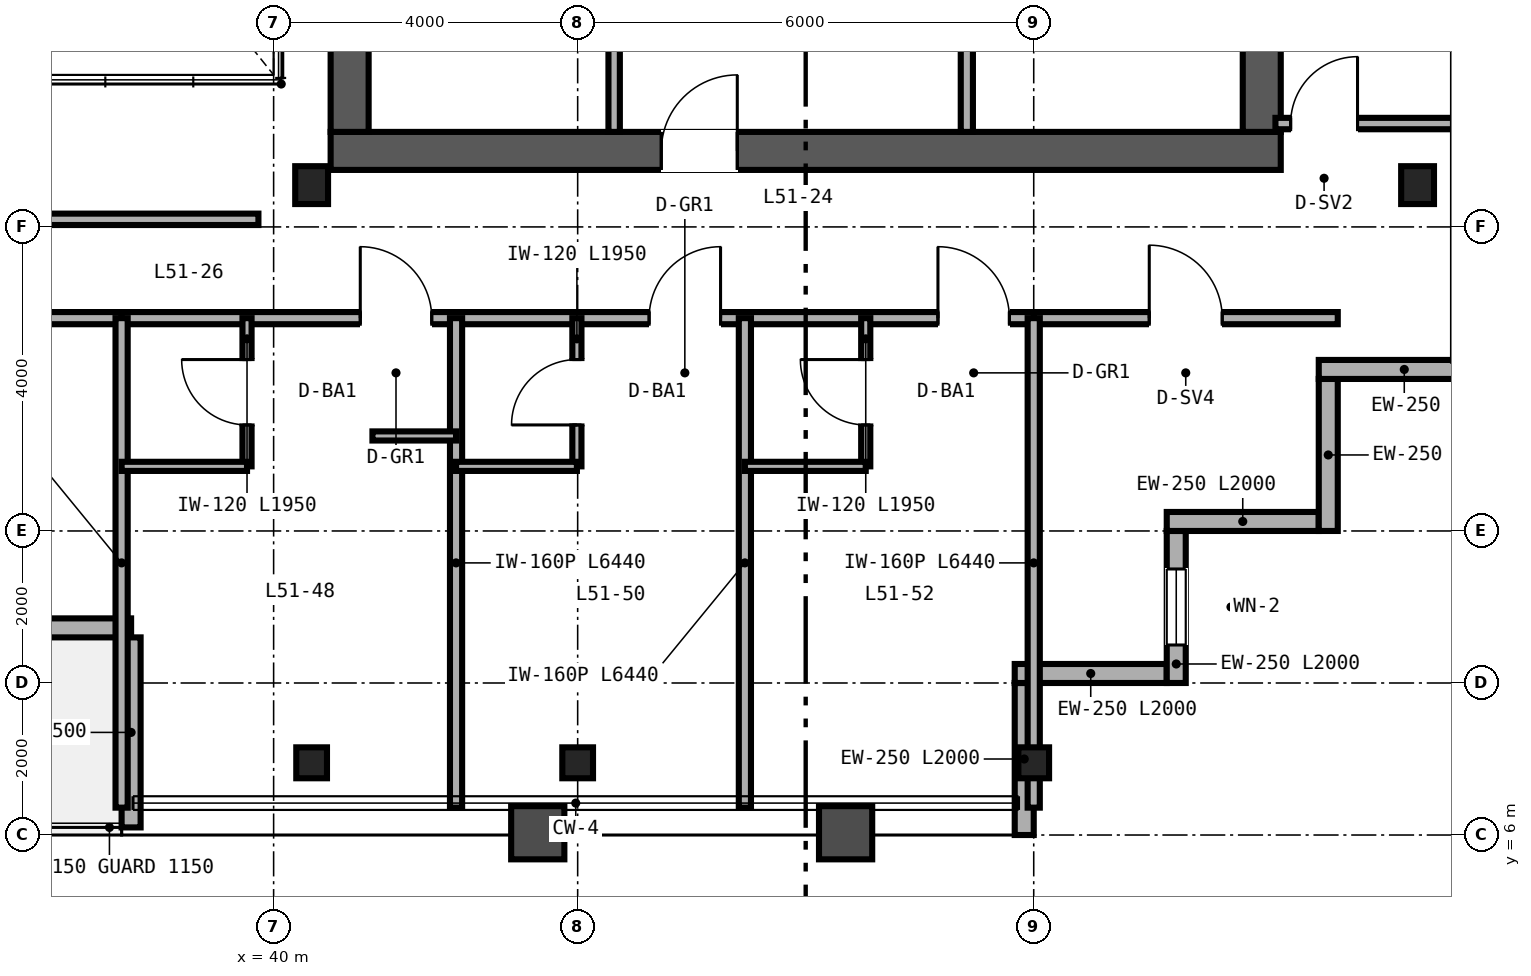
"""IFC4 building model, lengths in metres.
Left out: names, types, materials, properties, quantities, classifications, styles, units other than length and angle.
Written with IfcOpenShell. Run it as: python <this file> out.ifc"""

import sys

from ifc_helpers import new_model, si_unit, direction, frame, frame_2d, origin, origin_2d, place, context, subcontext, project, spatial, rectangle, i_section, extrude, source, transform, mapped, element, fill, save


model = new_model("IFC4")
c1 = context("Model", 3, precision=1e-05, world=origin(), true_north=direction((0.0, 1.0)))
c2 = subcontext(c1, "Body", "Model", "MODEL_VIEW")
j1 = project(units=[si_unit("LENGTHUNIT", "METRE"), si_unit("PLANEANGLEUNIT", "RADIAN")], contexts=[c1])
p1 = place(None, origin())
s1 = spatial("IfcSite", under=j1, at=p1, CompositionType="ELEMENT")
p2 = place(p1, origin())
s2 = spatial("IfcBuilding", under=s1, at=p2, CompositionType="ELEMENT")
p3 = place(p2, frame((0.0, 0.0, 202.8)))
s3 = spatial("IfcBuildingStorey", under=s2, at=p3, CompositionType="ELEMENT", Elevation=202.8)
p4 = place(p3, frame((40.75, 15.0, 0.0), z_axis=(0.0, 0.0, 1.0), x_axis=(1.0, 0.0, 0.0)))
e1 = element("IfcWall", 1, at=p4, inside=s3, PredefinedType="SHEAR", context=c2, shape_type="SweptSolid", body=[
    extrude(rectangle(XDim=12.5, YDim=0.5, at=frame_2d((6.25, 0.0))), origin(), (0.0, 0.0, 1.0), 3.37),
])
p5 = place(p4, frame((4.35, 0.0, 0.0)))
e2 = element("IfcOpeningElement", 2, at=p5, cuts=e1, PredefinedType="OPENING", context=c2, shape_type="SweptSolid", body=[
    extrude(rectangle(XDim=1.0, YDim=2.15, at=frame_2d((0.5, 1.075))), frame((0.0, 0.26, 0.0), z_axis=(0.0, -1.0, 0.0), x_axis=(1.0, 0.0, 0.0)), (0.0, 0.0, 1.0), 0.52),
])
for number, where, z_axis, x_axis in (
    (3, (41.0, 15.25, 0.0), (0.0, 0.0, 1.0), (0.0, 1.0, 0.0)),
    (4, (53.0, 15.25, 0.0), (0.0, 0.0, 1.0), (0.0, 1.0, 0.0)),
):
    element("IfcWall", number, at=place(p3, frame(where, z_axis=z_axis, x_axis=x_axis)), inside=s3, PredefinedType="SHEAR", context=c2, shape_type="SweptSolid", body=[
        extrude(rectangle(XDim=21.5, YDim=0.5, at=frame_2d((10.75, 0.0))), origin(), (0.0, 0.0, 1.0), 3.37),
    ])
m1 = source(origin(), c2, "Body", "SweptSolid", [
    extrude(i_section(OverallWidth=0.432, OverallDepth=0.498, WebThickness=0.056, FlangeThickness=0.089, FilletRadius=0.025, at=origin_2d()), origin(), (0.0, 0.0, 1.0), 3.37),
])
for number, where, z_axis, x_axis in (
    (5, (40.5, 14.55, 0.0), (0.0, 0.0, 1.0), (1.0, 0.0, 0.0)),
    (6, (55.05, 14.55, 0.0), (0.0, 0.0, 1.0), (1.0, 0.0, 0.0)),
):
    element("IfcColumn", number, at=place(p3, frame(where, z_axis=z_axis, x_axis=x_axis)), inside=s3, PredefinedType="COLUMN", context=c2, shape_type="MappedRepresentation", body=[
        mapped(m1, transform((0.0, 0.0, 0.0), scale=1.0)),
    ])
m2 = source(origin(), c2, "Body", "SweptSolid", [
    extrude(i_section(OverallWidth=0.404, OverallDepth=0.407, WebThickness=0.027, FlangeThickness=0.044, FilletRadius=0.025, at=origin_2d()), origin(), (0.0, 0.0, 1.0), 3.37),
])
for number, where, z_axis, x_axis in (
    (7, (40.5, 6.95, 0.0), (0.0, 0.0, 1.0), (1.0, 0.0, 0.0)),
    (8, (44.0, 6.95, 0.0), (0.0, 0.0, 1.0), (1.0, 0.0, 0.0)),
    (9, (50.0, 6.95, 0.0), (0.0, 0.0, 1.0), (1.0, 0.0, 0.0)),
):
    element("IfcColumn", number, at=place(p3, frame(where, z_axis=z_axis, x_axis=x_axis)), inside=s3, PredefinedType="COLUMN", context=c2, shape_type="MappedRepresentation", body=[
        mapped(m2, transform((0.0, 0.0, 0.0), scale=1.0)),
    ])
p6 = place(p3, frame((49.875, 6.0, 0.0), z_axis=(0.0, 0.0, 1.0), x_axis=(0.0, 1.0, 0.0)))
e10 = element("IfcWall", 10, at=p6, inside=s3, PredefinedType="SOLIDWALL", context=c2, shape_type="SweptSolid", body=[
    extrude(rectangle(XDim=2.0, YDim=0.25, at=frame_2d((1.0, 0.0))), origin(), (0.0, 0.0, 1.0), 2.677),
])
p7 = place(p3, frame((49.75, 8.125, 0.0), z_axis=(0.0, 0.0, 1.0), x_axis=(1.0, 0.0, 0.0)))
e11 = element("IfcWall", 11, at=p7, inside=s3, PredefinedType="SOLIDWALL", context=c2, shape_type="SweptSolid", body=[
    extrude(rectangle(XDim=2.0, YDim=0.25, at=frame_2d((1.0, 0.0))), origin(), (0.0, 0.0, 1.0), 3.37),
])
p8 = place(p3, frame((51.875, 8.0, 0.0), z_axis=(0.0, 0.0, 1.0), x_axis=(0.0, 1.0, 0.0)))
e12 = element("IfcWall", 12, at=p8, inside=s3, PredefinedType="SOLIDWALL", context=c2, shape_type="SweptSolid", body=[
    extrude(rectangle(XDim=2.0, YDim=0.25, at=frame_2d((1.0, 0.0))), origin(), (0.0, 0.0, 1.0), 3.37),
])
p9 = place(p8, frame((0.5, 0.0, 0.85)))
e13 = element("IfcOpeningElement", 13, at=p9, cuts=e12, PredefinedType="OPENING", context=c2, shape_type="SweptSolid", body=[
    extrude(rectangle(XDim=1.0, YDim=1.9, at=frame_2d((0.5, 0.95))), frame((0.0, 0.135, 0.0), z_axis=(0.0, -1.0, 0.0), x_axis=(1.0, 0.0, 0.0)), (0.0, 0.0, 1.0), 0.27),
])
for number, where, z_axis, x_axis in (
    (14, (51.75, 10.125, 0.0), (0.0, 0.0, 1.0), (1.0, 0.0, 0.0)),
    (15, (53.875, 10.0, 0.0), (0.0, 0.0, 1.0), (0.0, 1.0, 0.0)),
):
    element("IfcWall", number, at=place(p3, frame(where, z_axis=z_axis, x_axis=x_axis)), inside=s3, PredefinedType="SOLIDWALL", context=c2, shape_type="SweptSolid", body=[
        extrude(rectangle(XDim=2.0, YDim=0.25, at=frame_2d((1.0, 0.0))), origin(), (0.0, 0.0, 1.0), 3.37),
    ])
p10 = place(p3, frame((53.75, 12.125, 0.0), z_axis=(0.0, 0.0, 1.0), x_axis=(1.0, 0.0, 0.0)))
e16 = element("IfcWall", 16, at=p10, inside=s3, PredefinedType="SOLIDWALL", context=c2, shape_type="SweptSolid", body=[
    extrude(rectangle(XDim=2.25, YDim=0.25, at=frame_2d((1.125, 0.0))), origin(), (0.0, 0.0, 1.0), 3.37),
])
p11 = place(p3, frame((25.875, 8.725, 0.0), z_axis=(0.0, 0.0, 1.0), x_axis=(1.0, 0.0, 0.0)))
e17 = element("IfcWall", 17, at=p11, inside=s3, PredefinedType="SOLIDWALL", context=c2, shape_type="SweptSolid", body=[
    extrude(rectangle(XDim=12.25, YDim=0.25, at=frame_2d((6.125, 0.0))), origin(), (0.0, 0.0, 1.0), 3.37),
])
p12 = place(p11, frame((5.6, 0.0, 0.0)))
e18 = element("IfcOpeningElement", 18, at=p12, cuts=e17, PredefinedType="OPENING", context=c2, shape_type="SweptSolid", body=[
    extrude(rectangle(XDim=1.05, YDim=2.15, at=frame_2d((0.525, 1.075))), frame((0.0, 0.135, 0.0), z_axis=(0.0, -1.0, 0.0), x_axis=(1.0, 0.0, 0.0)), (0.0, 0.0, 1.0), 0.27),
])
p13 = place(p3, frame((38.125, 6.1, 0.0), z_axis=(0.0, 0.0, 1.0), x_axis=(0.0, 1.0, 0.0)))
e19 = element("IfcWall", 19, at=p13, inside=s3, PredefinedType="SOLIDWALL", context=c2, shape_type="SweptSolid", body=[
    extrude(rectangle(XDim=2.5, YDim=0.25, at=frame_2d((1.25, 0.0))), origin(), (0.0, 0.0, 1.0), 2.443),
])
p14 = place(p3, frame((49.12, 15.25, 0.0), z_axis=(0.0, 0.0, 1.0), x_axis=(0.0, 1.0, 0.0)))
e20 = element("IfcWall", 20, at=p14, inside=s3, PredefinedType="PARTITIONING", context=c2, shape_type="SweptSolid", body=[
    extrude(rectangle(XDim=16.13, YDim=0.16, at=frame_2d((8.065, 0.0))), origin(), (0.0, 0.0, 1.0), 2.443),
])
p15 = place(p14, frame((4.0, 0.0, 0.0)))
e21 = element("IfcOpeningElement", 21, at=p15, cuts=e20, PredefinedType="OPENING", context=c2, shape_type="SweptSolid", body=[
    extrude(rectangle(XDim=0.92, YDim=2.15, at=frame_2d((0.46, 1.075))), frame((0.0, 0.09, 0.0), z_axis=(0.0, -1.0, 0.0), x_axis=(1.0, 0.0, 0.0)), (0.0, 0.0, 1.0), 0.18),
])
p16 = place(p14, frame((12.0, 0.0, 0.0)))
e22 = element("IfcOpeningElement", 22, at=p16, cuts=e20, PredefinedType="OPENING", context=c2, shape_type="SweptSolid", body=[
    extrude(rectangle(XDim=0.92, YDim=2.15, at=frame_2d((0.46, 1.075))), frame((0.0, 0.09, 0.0), z_axis=(0.0, -1.0, 0.0), x_axis=(1.0, 0.0, 0.0)), (0.0, 0.0, 1.0), 0.18),
])
p17 = place(p3, frame((44.48, 15.25, 0.0), z_axis=(0.0, 0.0, 1.0), x_axis=(0.0, 1.0, 0.0)))
e23 = element("IfcWall", 23, at=p17, inside=s3, PredefinedType="PARTITIONING", context=c2, shape_type="SweptSolid", body=[
    extrude(rectangle(XDim=11.63, YDim=0.15, at=frame_2d((5.815, 0.0))), origin(), (0.0, 0.0, 1.0), 3.37),
])
p18 = place(p17, frame((4.5, 0.0, 0.0)))
e24 = element("IfcOpeningElement", 24, at=p18, cuts=e23, PredefinedType="OPENING", context=c2, shape_type="SweptSolid", body=[
    extrude(rectangle(XDim=0.92, YDim=2.15, at=frame_2d((0.46, 1.075))), frame((0.0, 0.085, 0.0), z_axis=(0.0, -1.0, 0.0), x_axis=(1.0, 0.0, 0.0)), (0.0, 0.0, 1.0), 0.17),
])
p19 = place(p3, frame((24.2, 14.1, 0.0), z_axis=(0.0, 0.0, 1.0), x_axis=(1.0, 0.0, 0.0)))
e25 = element("IfcWall", 25, at=p19, inside=s3, PredefinedType="PARTITIONING", context=c2, shape_type="SweptSolid", body=[
    extrude(rectangle(XDim=15.6, YDim=0.15, at=frame_2d((7.8, 0.0))), origin(), (0.0, 0.0, 1.0), 3.37),
])
p20 = place(p19, frame((3.0, 0.0, 0.0)))
e26 = element("IfcOpeningElement", 26, at=p20, cuts=e25, PredefinedType="OPENING", context=c2, shape_type="SweptSolid", body=[
    extrude(rectangle(XDim=0.9, YDim=2.15, at=frame_2d((0.45, 1.075))), frame((0.0, 0.085, 0.0), z_axis=(0.0, -1.0, 0.0), x_axis=(1.0, 0.0, 0.0)), (0.0, 0.0, 1.0), 0.17),
])
p21 = place(p19, frame((11.0, 0.0, 0.0)))
e27 = element("IfcOpeningElement", 27, at=p21, cuts=e25, PredefinedType="OPENING", context=c2, shape_type="SweptSolid", body=[
    extrude(rectangle(XDim=0.9, YDim=2.15, at=frame_2d((0.45, 1.075))), frame((0.0, 0.085, 0.0), z_axis=(0.0, -1.0, 0.0), x_axis=(1.0, 0.0, 0.0)), (0.0, 0.0, 1.0), 0.17),
])
p22 = place(p3, frame((53.18, 15.36, 0.0), z_axis=(0.0, 0.0, 1.0), x_axis=(1.0, 0.0, 0.0)))
e28 = element("IfcWall", 28, at=p22, inside=s3, PredefinedType="PARTITIONING", context=c2, shape_type="SweptSolid", body=[
    extrude(rectangle(XDim=2.66, YDim=0.15, at=frame_2d((1.33, 0.0))), origin(), (0.0, 0.0, 1.0), 2.591),
])
p23 = place(p22, frame((0.2, 0.0, 0.0)))
e29 = element("IfcOpeningElement", 29, at=p23, cuts=e28, PredefinedType="OPENING", context=c2, shape_type="SweptSolid", body=[
    extrude(rectangle(XDim=0.88, YDim=2.15, at=frame_2d((0.44, 1.075))), frame((0.0, 0.085, 0.0), z_axis=(0.0, -1.0, 0.0), x_axis=(1.0, 0.0, 0.0)), (0.0, 0.0, 1.0), 0.17),
])
p24 = place(p3, frame((50.0, 12.8, 0.0), z_axis=(0.0, 0.0, 1.0), x_axis=(1.0, 0.0, 0.0)))
e30 = element("IfcWall", 30, at=p24, inside=s3, PredefinedType="PARTITIONING", context=c2, shape_type="SweptSolid", body=[
    extrude(rectangle(XDim=4.0, YDim=0.16, at=frame_2d((2.0, 0.0))), origin(), (0.0, 0.0, 1.0), 3.37),
])
p25 = place(p24, frame((1.52, 0.0, 0.0)))
e31 = element("IfcOpeningElement", 31, at=p25, cuts=e30, PredefinedType="OPENING", context=c2, shape_type="SweptSolid", body=[
    extrude(rectangle(XDim=0.96, YDim=2.15, at=frame_2d((0.48, 1.075))), frame((0.0, 0.09, 0.0), z_axis=(0.0, -1.0, 0.0), x_axis=(1.0, 0.0, 0.0)), (0.0, 0.0, 1.0), 0.18),
])
p26 = place(p3, frame((26.0, 12.8, 0.0), z_axis=(0.0, 0.0, 1.0), x_axis=(1.0, 0.0, 0.0)))
e32 = element("IfcWall", 32, at=p26, inside=s3, PredefinedType="PARTITIONING", context=c2, shape_type="SweptSolid", body=[
    extrude(rectangle(XDim=12.0, YDim=0.16, at=frame_2d((6.0, 0.0))), origin(), (0.0, 0.0, 1.0), 3.37),
])
p27 = place(p26, frame((5.2, 0.0, 0.0)))
e33 = element("IfcOpeningElement", 33, at=p27, cuts=e32, PredefinedType="OPENING", context=c2, shape_type="SweptSolid", body=[
    extrude(rectangle(XDim=0.96, YDim=2.15, at=frame_2d((0.48, 1.075))), frame((0.0, 0.09, 0.0), z_axis=(0.0, -1.0, 0.0), x_axis=(1.0, 0.0, 0.0)), (0.0, 0.0, 1.0), 0.18),
])
p28 = place(p3, frame((38.0, 12.8, 0.0), z_axis=(0.0, 0.0, 1.0), x_axis=(1.0, 0.0, 0.0)))
e34 = element("IfcWall", 34, at=p28, inside=s3, PredefinedType="PARTITIONING", context=c2, shape_type="SweptSolid", body=[
    extrude(rectangle(XDim=12.0, YDim=0.16, at=frame_2d((6.0, 0.0))), origin(), (0.0, 0.0, 1.0), 2.913),
])
p29 = place(p28, frame((3.14, 0.0, 0.0)))
e35 = element("IfcOpeningElement", 35, at=p29, cuts=e34, PredefinedType="OPENING", context=c2, shape_type="SweptSolid", body=[
    extrude(rectangle(XDim=0.94, YDim=2.15, at=frame_2d((0.47, 1.075))), frame((0.0, 0.09, 0.0), z_axis=(0.0, -1.0, 0.0), x_axis=(1.0, 0.0, 0.0)), (0.0, 0.0, 1.0), 0.18),
])
p30 = place(p28, frame((6.94, 0.0, 0.0)))
e36 = element("IfcOpeningElement", 36, at=p30, cuts=e34, PredefinedType="OPENING", context=c2, shape_type="SweptSolid", body=[
    extrude(rectangle(XDim=0.94, YDim=2.15, at=frame_2d((0.47, 1.075))), frame((0.0, 0.09, 0.0), z_axis=(0.0, -1.0, 0.0), x_axis=(1.0, 0.0, 0.0)), (0.0, 0.0, 1.0), 0.18),
])
p31 = place(p28, frame((10.74, 0.0, 0.0)))
e37 = element("IfcOpeningElement", 37, at=p31, cuts=e34, PredefinedType="OPENING", context=c2, shape_type="SweptSolid", body=[
    extrude(rectangle(XDim=0.94, YDim=2.15, at=frame_2d((0.47, 1.075))), frame((0.0, 0.09, 0.0), z_axis=(0.0, -1.0, 0.0), x_axis=(1.0, 0.0, 0.0)), (0.0, 0.0, 1.0), 0.18),
])
p32 = place(p3, frame((38.0, 6.36, 0.0), z_axis=(0.0, 0.0, 1.0), x_axis=(0.0, 1.0, 0.0)))
e38 = element("IfcWall", 38, at=p32, inside=s3, PredefinedType="PARTITIONING", context=c2, shape_type="SweptSolid", body=[
    extrude(rectangle(XDim=6.44, YDim=0.16, at=frame_2d((3.22, 0.0))), origin(), (0.0, 0.0, 1.0), 2.443),
])
p33 = place(p3, frame((50.0, 6.36, 0.0), z_axis=(0.0, 0.0, 1.0), x_axis=(0.0, 1.0, 0.0)))
e39 = element("IfcWall", 39, at=p33, inside=s3, PredefinedType="PARTITIONING", context=c2, shape_type="SweptSolid", body=[
    extrude(rectangle(XDim=6.44, YDim=0.16, at=frame_2d((3.22, 0.0))), origin(), (0.0, 0.0, 1.0), 2.677),
])
p34 = place(p3, frame((42.4, 6.36, 0.0), z_axis=(0.0, 0.0, 1.0), x_axis=(0.0, 1.0, 0.0)))
e40 = element("IfcWall", 40, at=p34, inside=s3, PredefinedType="PARTITIONING", context=c2, shape_type="SweptSolid", body=[
    extrude(rectangle(XDim=6.44, YDim=0.16, at=frame_2d((3.22, 0.0))), origin(), (0.0, 0.0, 1.0), 2.833),
])
p35 = place(p3, frame((39.65, 10.85, 0.0), z_axis=(0.0, 0.0, 1.0), x_axis=(0.0, 1.0, 0.0)))
e41 = element("IfcWall", 41, at=p35, inside=s3, PredefinedType="PARTITIONING", context=c2, shape_type="SweptSolid", body=[
    extrude(rectangle(XDim=1.95, YDim=0.12, at=frame_2d((0.975, 0.0))), origin(), (0.0, 0.0, 1.0), 3.37),
])
p36 = place(p35, frame((0.545, 0.0, 0.0)))
e42 = element("IfcOpeningElement", 42, at=p36, cuts=e41, PredefinedType="OPENING", context=c2, shape_type="SweptSolid", body=[
    extrude(rectangle(XDim=0.86, YDim=2.1, at=frame_2d((0.43, 1.05))), frame((0.0, 0.07, 0.0), z_axis=(0.0, -1.0, 0.0), x_axis=(1.0, 0.0, 0.0)), (0.0, 0.0, 1.0), 0.14),
])
p37 = place(p3, frame((38.0, 10.85, 0.0), z_axis=(0.0, 0.0, 1.0), x_axis=(1.0, 0.0, 0.0)))
e43 = element("IfcWall", 43, at=p37, inside=s3, PredefinedType="PARTITIONING", context=c2, shape_type="SweptSolid", body=[
    extrude(rectangle(XDim=1.65, YDim=0.12, at=frame_2d((0.825, 0.0))), origin(), (0.0, 0.0, 1.0), 3.37),
])
p38 = place(p3, frame((41.3, 11.25, 0.0), z_axis=(0.0, 0.0, 1.0), x_axis=(1.0, 0.0, 0.0)))
e44 = element("IfcWall", 44, at=p38, inside=s3, PredefinedType="PARTITIONING", context=c2, shape_type="SweptSolid", body=[
    extrude(rectangle(XDim=1.1, YDim=0.12, at=frame_2d((0.55, 0.0))), origin(), (0.0, 0.0, 1.0), 3.37),
])
p39 = place(p3, frame((46.2, 6.36, 0.0), z_axis=(0.0, 0.0, 1.0), x_axis=(0.0, 1.0, 0.0)))
e45 = element("IfcWall", 45, at=p39, inside=s3, PredefinedType="PARTITIONING", context=c2, shape_type="SweptSolid", body=[
    extrude(rectangle(XDim=6.44, YDim=0.16, at=frame_2d((3.22, 0.0))), origin(), (0.0, 0.0, 1.0), 2.677),
])
p40 = place(p3, frame((43.99, 10.85, 0.0), z_axis=(0.0, 0.0, 1.0), x_axis=(0.0, 1.0, 0.0)))
e46 = element("IfcWall", 46, at=p40, inside=s3, PredefinedType="PARTITIONING", context=c2, shape_type="SweptSolid", body=[
    extrude(rectangle(XDim=1.95, YDim=0.12, at=frame_2d((0.975, 0.0))), origin(), (0.0, 0.0, 1.0), 3.37),
])
p41 = place(p40, frame((0.545, 0.0, 0.0)))
e47 = element("IfcOpeningElement", 47, at=p41, cuts=e46, PredefinedType="OPENING", context=c2, shape_type="SweptSolid", body=[
    extrude(rectangle(XDim=0.86, YDim=2.1, at=frame_2d((0.43, 1.05))), frame((0.0, 0.07, 0.0), z_axis=(0.0, -1.0, 0.0), x_axis=(1.0, 0.0, 0.0)), (0.0, 0.0, 1.0), 0.14),
])
p42 = place(p3, frame((42.4, 10.85, 0.0), z_axis=(0.0, 0.0, 1.0), x_axis=(1.0, 0.0, 0.0)))
e48 = element("IfcWall", 48, at=p42, inside=s3, PredefinedType="PARTITIONING", context=c2, shape_type="SweptSolid", body=[
    extrude(rectangle(XDim=1.59, YDim=0.12, at=frame_2d((0.795, 0.0))), origin(), (0.0, 0.0, 1.0), 3.37),
])
p43 = place(p3, frame((47.79, 10.85, 0.0), z_axis=(0.0, 0.0, 1.0), x_axis=(0.0, 1.0, 0.0)))
e49 = element("IfcWall", 49, at=p43, inside=s3, PredefinedType="PARTITIONING", context=c2, shape_type="SweptSolid", body=[
    extrude(rectangle(XDim=1.95, YDim=0.12, at=frame_2d((0.975, 0.0))), origin(), (0.0, 0.0, 1.0), 3.37),
])
p44 = place(p43, frame((0.545, 0.0, 0.0)))
e50 = element("IfcOpeningElement", 50, at=p44, cuts=e49, PredefinedType="OPENING", context=c2, shape_type="SweptSolid", body=[
    extrude(rectangle(XDim=0.86, YDim=2.1, at=frame_2d((0.43, 1.05))), frame((0.0, 0.07, 0.0), z_axis=(0.0, -1.0, 0.0), x_axis=(1.0, 0.0, 0.0)), (0.0, 0.0, 1.0), 0.14),
])
p45 = place(p3, frame((46.2, 10.85, 0.0), z_axis=(0.0, 0.0, 1.0), x_axis=(1.0, 0.0, 0.0)))
e51 = element("IfcWall", 51, at=p45, inside=s3, PredefinedType="PARTITIONING", context=c2, shape_type="SweptSolid", body=[
    extrude(rectangle(XDim=1.59, YDim=0.12, at=frame_2d((0.795, 0.0))), origin(), (0.0, 0.0, 1.0), 3.37),
])
m3 = source(origin(), c2, "Body", "SweptSolid", [
    extrude(rectangle(XDim=1.0, YDim=1.9, at=frame_2d((0.5, 0.95))), frame((0.0, 0.03, 0.0), z_axis=(0.0, -1.0, 0.0), x_axis=(1.0, 0.0, 0.0)), (0.0, 0.0, 1.0), 0.06),
])
p46 = place(p9, origin())
e52 = element("IfcWindow", 52, at=p46, inside=s3, PartitioningType="SINGLE_PANEL", PredefinedType="WINDOW", context=c2, shape_type="MappedRepresentation", body=[
    mapped(m3, transform((0.0, 0.0, 0.0), scale=1.0)),
])
fill(e13, e52)
m4 = source(origin(), c2, "Body", "SweptSolid", [
    extrude(rectangle(XDim=1.0, YDim=2.15, at=frame_2d((0.5, 1.075))), frame((0.0, 0.025, 0.0), z_axis=(0.0, -1.0, 0.0), x_axis=(1.0, 0.0, 0.0)), (0.0, 0.0, 1.0), 0.05),
])
p47 = place(p5, origin())
e53 = element("IfcDoor", 53, at=p47, inside=s3, OperationType="SINGLE_SWING_RIGHT", PredefinedType="DOOR", context=c2, shape_type="MappedRepresentation", body=[
    mapped(m4, transform((0.0, 0.0, 0.0), scale=1.0)),
])
fill(e2, e53)
m5 = source(origin(), c2, "Body", "SweptSolid", [
    extrude(rectangle(XDim=0.88, YDim=2.15, at=frame_2d((0.44, 1.075))), frame((0.0, 0.025, 0.0), z_axis=(0.0, -1.0, 0.0), x_axis=(1.0, 0.0, 0.0)), (0.0, 0.0, 1.0), 0.05),
])
p48 = place(p23, origin())
e54 = element("IfcDoor", 54, at=p48, inside=s3, OperationType="SINGLE_SWING_RIGHT", PredefinedType="DOOR", context=c2, shape_type="MappedRepresentation", body=[
    mapped(m5, transform((0.0, 0.0, 0.0), scale=1.0)),
])
fill(e29, e54)
m6 = source(origin(), c2, "Body", "SweptSolid", [
    extrude(rectangle(XDim=0.96, YDim=2.15, at=frame_2d((0.48, 1.075))), frame((0.0, 0.025, 0.0), z_axis=(0.0, -1.0, 0.0), x_axis=(1.0, 0.0, 0.0)), (0.0, 0.0, 1.0), 0.05),
])
p49 = place(p25, origin())
e55 = element("IfcDoor", 55, at=p49, inside=s3, OperationType="SINGLE_SWING_LEFT", PredefinedType="DOOR", context=c2, shape_type="MappedRepresentation", body=[
    mapped(m6, transform((0.0, 0.0, 0.0), scale=1.0)),
])
fill(e31, e55)
m7 = source(origin(), c2, "Body", "SweptSolid", [
    extrude(rectangle(XDim=0.86, YDim=2.1, at=frame_2d((0.43, 1.05))), frame((0.0, 0.025, 0.0), z_axis=(0.0, -1.0, 0.0), x_axis=(1.0, 0.0, 0.0)), (0.0, 0.0, 1.0), 0.05),
])
p50 = place(p36, origin())
e56 = element("IfcDoor", 56, at=p50, inside=s3, OperationType="SINGLE_SWING_RIGHT", PredefinedType="DOOR", context=c2, shape_type="MappedRepresentation", body=[
    mapped(m7, transform((0.0, 0.0, 0.0), scale=1.0)),
])
fill(e42, e56)
p51 = place(p41, origin())
e57 = element("IfcDoor", 57, at=p51, inside=s3, OperationType="SINGLE_SWING_LEFT", PredefinedType="DOOR", context=c2, shape_type="MappedRepresentation", body=[
    mapped(m7, transform((0.0, 0.0, 0.0), scale=1.0)),
])
fill(e47, e57)
p52 = place(p44, origin())
e58 = element("IfcDoor", 58, at=p52, inside=s3, OperationType="SINGLE_SWING_RIGHT", PredefinedType="DOOR", context=c2, shape_type="MappedRepresentation", body=[
    mapped(m7, transform((0.0, 0.0, 0.0), scale=1.0)),
])
fill(e50, e58)
m8 = source(origin(), c2, "Body", "SweptSolid", [
    extrude(rectangle(XDim=0.94, YDim=2.15, at=frame_2d((0.47, 1.075))), frame((0.0, 0.025, 0.0), z_axis=(0.0, -1.0, 0.0), x_axis=(1.0, 0.0, 0.0)), (0.0, 0.0, 1.0), 0.05),
])
p53 = place(p29, origin())
e59 = element("IfcDoor", 59, at=p53, inside=s3, OperationType="SINGLE_SWING_LEFT", PredefinedType="DOOR", context=c2, shape_type="MappedRepresentation", body=[
    mapped(m8, transform((0.0, 0.0, 0.0), scale=1.0)),
])
fill(e35, e59)
p54 = place(p30, origin())
e60 = element("IfcDoor", 60, at=p54, inside=s3, OperationType="SINGLE_SWING_RIGHT", PredefinedType="DOOR", context=c2, shape_type="MappedRepresentation", body=[
    mapped(m8, transform((0.0, 0.0, 0.0), scale=1.0)),
])
fill(e36, e60)
p55 = place(p31, origin())
e61 = element("IfcDoor", 61, at=p55, inside=s3, OperationType="SINGLE_SWING_LEFT", PredefinedType="DOOR", context=c2, shape_type="MappedRepresentation", body=[
    mapped(m8, transform((0.0, 0.0, 0.0), scale=1.0)),
])
fill(e37, e61)
save(model, sys.argv[1])
